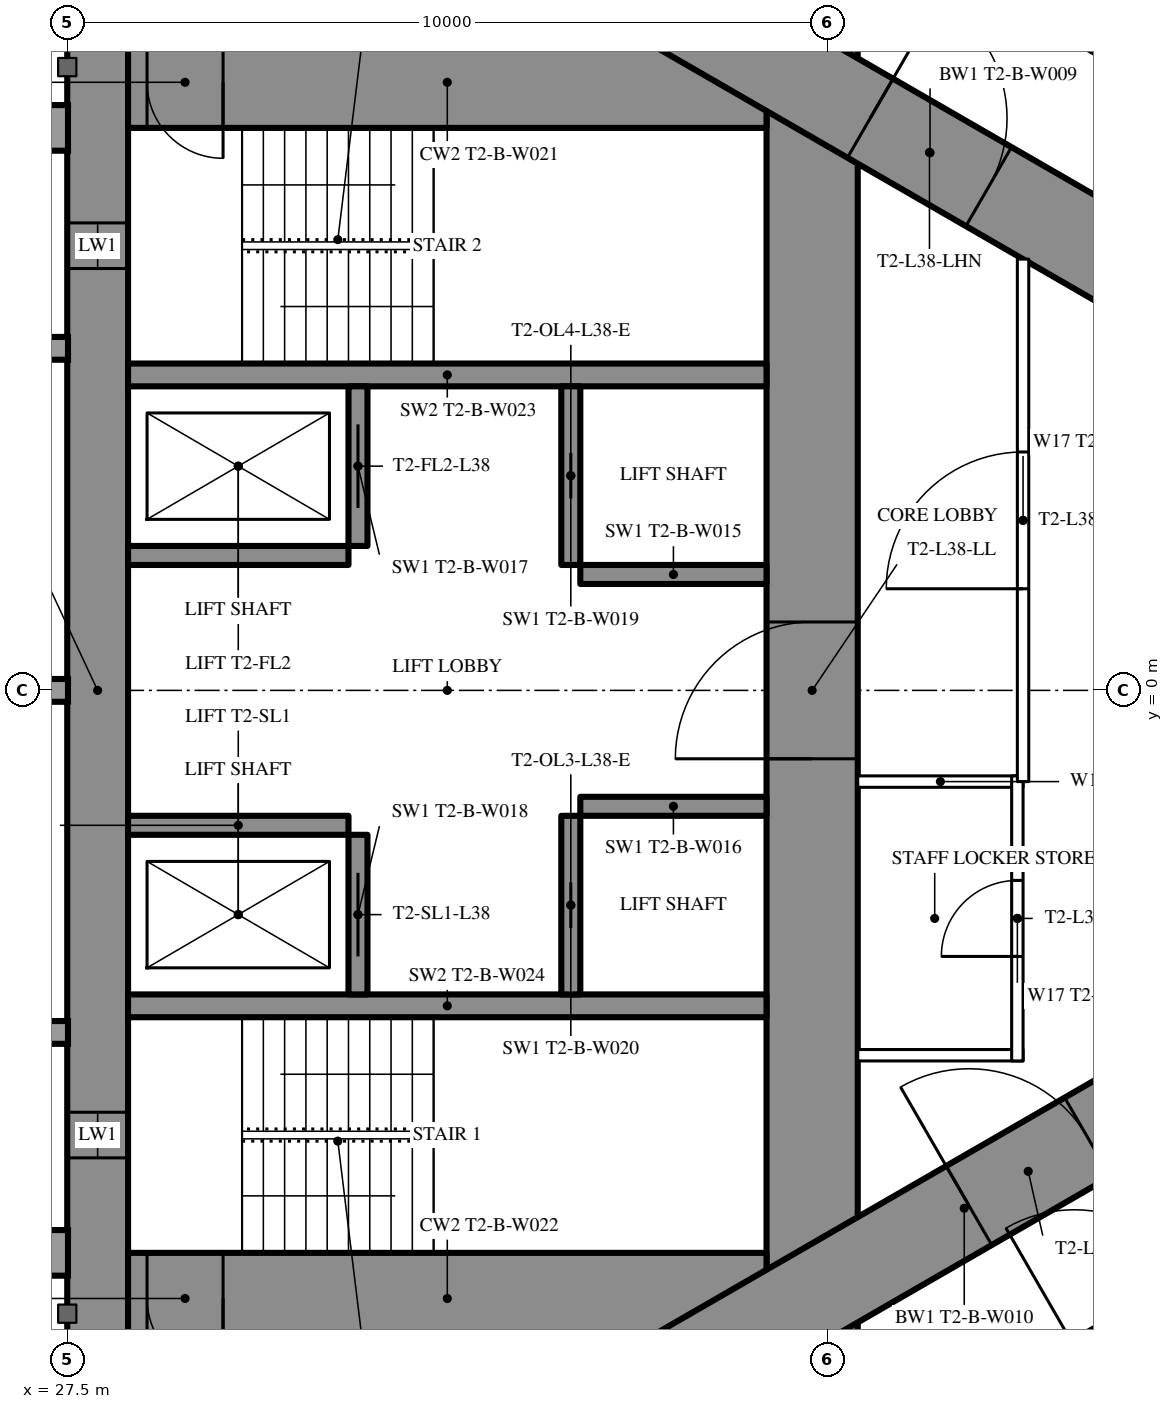
"""IFC4 building model, lengths in metres.
Left out: names, types, materials, properties, quantities, classifications, styles, units other than length and angle.
Written with IfcOpenShell. Run it as: python <this file> out.ifc"""

import sys

from ifc_helpers import new_model, si_unit, direction, frame, frame_2d, origin, place, context, subcontext, project, spatial, rectangle, extrude, element, fill, save


model = new_model("IFC4")
c1 = context("Model", 3, precision=1e-05, world=origin(), true_north=direction((0.0, 1.0)))
c2 = subcontext(c1, "Body", "Model", "MODEL_VIEW")
j1 = project(units=[si_unit("LENGTHUNIT", "METRE"), si_unit("PLANEANGLEUNIT", "RADIAN")], contexts=[c1])
p1 = place(None, origin())
s1 = spatial("IfcSite", under=j1, at=p1, CompositionType="ELEMENT")
p2 = place(p1, origin())
s2 = spatial("IfcBuilding", under=s1, at=p2, CompositionType="ELEMENT")
p3 = place(p2, frame((0.0, 0.0, 143.1)))
s3 = spatial("IfcBuildingStorey", under=s2, at=p3, CompositionType="ELEMENT", Elevation=143.1)
p4 = place(p3, frame((27.9, -8.6, 0.0), z_axis=(0.0, 0.0, 1.0), x_axis=(0.0, 1.0, 0.0)))
e1 = element("IfcWall", 1, at=p4, inside=s3, PredefinedType="SHEAR", context=c2, shape_type="SweptSolid", body=[
    extrude(rectangle(XDim=17.2, YDim=0.8, at=frame_2d((8.6, 0.0))), origin(), (0.0, 0.0, 1.0), 3.6),
])
p5 = place(p4, frame((2.45, 0.0, 0.6)))
e2 = element("IfcOpeningElement", 2, at=p5, cuts=e1, PredefinedType="OPENING", context=c2, shape_type="SweptSolid", body=[
    extrude(rectangle(XDim=0.6, YDim=2.1, at=frame_2d((0.3, 1.05))), frame((0.0, 0.41, 0.0), z_axis=(0.0, -1.0, 0.0), x_axis=(1.0, 0.0, 0.0)), (0.0, 0.0, 1.0), 0.82),
])
p6 = place(p4, frame((14.15, 0.0, 0.6)))
e3 = element("IfcOpeningElement", 3, at=p6, cuts=e1, PredefinedType="OPENING", context=c2, shape_type="SweptSolid", body=[
    extrude(rectangle(XDim=0.6, YDim=2.1, at=frame_2d((0.3, 1.05))), frame((0.0, 0.41, 0.0), z_axis=(0.0, -1.0, 0.0), x_axis=(1.0, 0.0, 0.0)), (0.0, 0.0, 1.0), 0.82),
])
p7 = place(p3, frame((37.3, -8.6, 0.0), z_axis=(0.0, 0.0, 1.0), x_axis=(0.0, 1.0, 0.0)))
e4 = element("IfcWall", 4, at=p7, inside=s3, PredefinedType="SHEAR", context=c2, shape_type="SweptSolid", body=[
    extrude(rectangle(XDim=17.2, YDim=1.2, at=frame_2d((8.6, 0.0))), origin(), (0.0, 0.0, 1.0), 3.6),
])
p8 = place(p7, frame((7.7, 0.0, 0.0)))
e5 = element("IfcOpeningElement", 5, at=p8, cuts=e4, PredefinedType="OPENING", context=c2, shape_type="SweptSolid", body=[
    extrude(rectangle(XDim=1.8, YDim=2.2, at=frame_2d((0.9, 1.1))), frame((0.0, 0.61, 0.0), z_axis=(0.0, -1.0, 0.0), x_axis=(1.0, 0.0, 0.0)), (0.0, 0.0, 1.0), 1.22),
])
p9 = place(p3, frame((28.3, -8.0, 0.0), z_axis=(0.0, 0.0, 1.0), x_axis=(1.0, 0.0, 0.0)))
e6 = element("IfcWall", 6, at=p9, inside=s3, PredefinedType="SHEAR", context=c2, shape_type="SweptSolid", body=[
    extrude(rectangle(XDim=8.4, YDim=1.2, at=frame_2d((4.2, 0.0))), origin(), (0.0, 0.0, 1.0), 3.6),
])
p10 = place(p9, frame((0.25, 0.0, 0.0)))
e7 = element("IfcOpeningElement", 7, at=p10, cuts=e6, PredefinedType="OPENING", context=c2, shape_type="SweptSolid", body=[
    extrude(rectangle(XDim=1.0, YDim=2.2, at=frame_2d((0.5, 1.1))), frame((0.0, 0.61, 0.0), z_axis=(0.0, -1.0, 0.0), x_axis=(1.0, 0.0, 0.0)), (0.0, 0.0, 1.0), 1.22),
])
p11 = place(p3, frame((28.3, 8.0, 0.0), z_axis=(0.0, 0.0, 1.0), x_axis=(1.0, 0.0, 0.0)))
e8 = element("IfcWall", 8, at=p11, inside=s3, PredefinedType="SHEAR", context=c2, shape_type="SweptSolid", body=[
    extrude(rectangle(XDim=8.4, YDim=1.2, at=frame_2d((4.2, 0.0))), origin(), (0.0, 0.0, 1.0), 3.6),
])
p12 = place(p11, frame((0.25, 0.0, 0.0)))
e9 = element("IfcOpeningElement", 9, at=p12, cuts=e8, PredefinedType="OPENING", context=c2, shape_type="SweptSolid", body=[
    extrude(rectangle(XDim=1.0, YDim=2.2, at=frame_2d((0.5, 1.1))), frame((0.0, 0.61, 0.0), z_axis=(0.0, -1.0, 0.0), x_axis=(1.0, 0.0, 0.0)), (0.0, 0.0, 1.0), 1.22),
])
for number, where, z_axis, x_axis in (
    (10, (28.3, -4.15, 0.0), (0.0, 0.0, 1.0), (1.0, 0.0, 0.0)),
    (11, (28.3, 4.15, 0.0), (0.0, 0.0, 1.0), (1.0, 0.0, 0.0)),
):
    element("IfcWall", number, at=place(p3, frame(where, z_axis=z_axis, x_axis=x_axis)), inside=s3, PredefinedType="SHEAR", context=c2, shape_type="SweptSolid", body=[
        extrude(rectangle(XDim=8.4, YDim=0.3, at=frame_2d((4.2, 0.0))), origin(), (0.0, 0.0, 1.0), 3.6),
    ])
p13 = place(p3, frame((31.325, -4.0, 0.0), z_axis=(0.0, 0.0, 1.0), x_axis=(0.0, 1.0, 0.0)))
e12 = element("IfcWall", 12, at=p13, inside=s3, PredefinedType="SHEAR", context=c2, shape_type="SweptSolid", body=[
    extrude(rectangle(XDim=2.1, YDim=0.25, at=frame_2d((1.05, 0.0))), origin(), (0.0, 0.0, 1.0), 3.6),
])
p14 = place(p13, frame((0.5, 0.0, 0.0)))
e13 = element("IfcOpeningElement", 13, at=p14, cuts=e12, PredefinedType="OPENING", context=c2, shape_type="SweptSolid", body=[
    extrude(rectangle(XDim=1.1, YDim=2.2, at=frame_2d((0.55, 1.1))), frame((0.0, 0.135, 0.0), z_axis=(0.0, -1.0, 0.0), x_axis=(1.0, 0.0, 0.0)), (0.0, 0.0, 1.0), 0.27),
])
p15 = place(p3, frame((34.125, -4.0, 0.0), z_axis=(0.0, 0.0, 1.0), x_axis=(0.0, 1.0, 0.0)))
e14 = element("IfcWall", 14, at=p15, inside=s3, PredefinedType="SHEAR", context=c2, shape_type="SweptSolid", body=[
    extrude(rectangle(XDim=2.35, YDim=0.25, at=frame_2d((1.175, 0.0))), origin(), (0.0, 0.0, 1.0), 3.6),
])
p16 = place(p15, frame((0.875, 0.0, 0.0)))
e15 = element("IfcOpeningElement", 15, at=p16, cuts=e14, PredefinedType="OPENING", context=c2, shape_type="SweptSolid", body=[
    extrude(rectangle(XDim=0.6, YDim=2.0, at=frame_2d((0.3, 1.0))), frame((0.0, 0.135, 0.0), z_axis=(0.0, -1.0, 0.0), x_axis=(1.0, 0.0, 0.0)), (0.0, 0.0, 1.0), 0.27),
])
p17 = place(p3, frame((28.3, -1.775, 0.0), z_axis=(0.0, 0.0, 1.0), x_axis=(1.0, 0.0, 0.0)))
e16 = element("IfcWall", 16, at=p17, inside=s3, PredefinedType="SHEAR", context=c2, shape_type="SweptSolid", body=[
    extrude(rectangle(XDim=2.9, YDim=0.25, at=frame_2d((1.45, 0.0))), origin(), (0.0, 0.0, 1.0), 3.6),
])
p18 = place(p3, frame((34.25, -1.525, 0.0), z_axis=(0.0, 0.0, 1.0), x_axis=(1.0, 0.0, 0.0)))
e17 = element("IfcWall", 17, at=p18, inside=s3, PredefinedType="SHEAR", context=c2, shape_type="SweptSolid", body=[
    extrude(rectangle(XDim=2.45, YDim=0.25, at=frame_2d((1.225, 0.0))), origin(), (0.0, 0.0, 1.0), 3.6),
])
p19 = place(p3, frame((31.325, 1.9, 0.0), z_axis=(0.0, 0.0, 1.0), x_axis=(0.0, 1.0, 0.0)))
e18 = element("IfcWall", 18, at=p19, inside=s3, PredefinedType="SHEAR", context=c2, shape_type="SweptSolid", body=[
    extrude(rectangle(XDim=2.1, YDim=0.25, at=frame_2d((1.05, 0.0))), origin(), (0.0, 0.0, 1.0), 3.6),
])
p20 = place(p19, frame((0.5, 0.0, 0.0)))
e19 = element("IfcOpeningElement", 19, at=p20, cuts=e18, PredefinedType="OPENING", context=c2, shape_type="SweptSolid", body=[
    extrude(rectangle(XDim=1.1, YDim=2.2, at=frame_2d((0.55, 1.1))), frame((0.0, 0.135, 0.0), z_axis=(0.0, -1.0, 0.0), x_axis=(1.0, 0.0, 0.0)), (0.0, 0.0, 1.0), 0.27),
])
p21 = place(p3, frame((34.125, 1.65, 0.0), z_axis=(0.0, 0.0, 1.0), x_axis=(0.0, 1.0, 0.0)))
e20 = element("IfcWall", 20, at=p21, inside=s3, PredefinedType="SHEAR", context=c2, shape_type="SweptSolid", body=[
    extrude(rectangle(XDim=2.35, YDim=0.25, at=frame_2d((1.175, 0.0))), origin(), (0.0, 0.0, 1.0), 3.6),
])
p22 = place(p21, frame((0.875, 0.0, 0.0)))
e21 = element("IfcOpeningElement", 21, at=p22, cuts=e20, PredefinedType="OPENING", context=c2, shape_type="SweptSolid", body=[
    extrude(rectangle(XDim=0.6, YDim=2.0, at=frame_2d((0.3, 1.0))), frame((0.0, 0.135, 0.0), z_axis=(0.0, -1.0, 0.0), x_axis=(1.0, 0.0, 0.0)), (0.0, 0.0, 1.0), 0.27),
])
p23 = place(p3, frame((28.3, 1.775, 0.0), z_axis=(0.0, 0.0, 1.0), x_axis=(1.0, 0.0, 0.0)))
e22 = element("IfcWall", 22, at=p23, inside=s3, PredefinedType="SHEAR", context=c2, shape_type="SweptSolid", body=[
    extrude(rectangle(XDim=2.9, YDim=0.25, at=frame_2d((1.45, 0.0))), origin(), (0.0, 0.0, 1.0), 3.6),
])
p24 = place(p3, frame((34.25, 1.525, 0.0), z_axis=(0.0, 0.0, 1.0), x_axis=(1.0, 0.0, 0.0)))
e23 = element("IfcWall", 23, at=p24, inside=s3, PredefinedType="SHEAR", context=c2, shape_type="SweptSolid", body=[
    extrude(rectangle(XDim=2.45, YDim=0.25, at=frame_2d((1.225, 0.0))), origin(), (0.0, 0.0, 1.0), 3.6),
])
p25 = place(p3, frame((27.2, -13.8, 0.0), z_axis=(0.0, 0.0, 1.0), x_axis=(0.866027159892, 0.499996958321, 0.0)))
e24 = element("IfcWall", 24, at=p25, inside=s3, PredefinedType="SHEAR", context=c2, shape_type="SweptSolid", body=[
    extrude(rectangle(XDim=27.947, YDim=1.2, at=frame_2d((13.973, 0.0))), origin(), (0.0, 0.0, 1.0), 3.6),
])
p26 = place(p25, frame((4.6, 0.0, 0.0)))
e25 = element("IfcOpeningElement", 25, at=p26, cuts=e24, PredefinedType="OPENING", context=c2, shape_type="SweptSolid", body=[
    extrude(rectangle(XDim=1.0, YDim=2.2, at=frame_2d((0.5, 1.1))), frame((0.0, 0.61, 0.0), z_axis=(0.0, -1.0, 0.0), x_axis=(1.0, 0.0, 0.0)), (0.0, 0.0, 1.0), 1.22),
])
p27 = place(p25, frame((14.045, 0.0, 0.0)))
e26 = element("IfcOpeningElement", 26, at=p27, cuts=e24, PredefinedType="OPENING", context=c2, shape_type="SweptSolid", body=[
    extrude(rectangle(XDim=1.8, YDim=2.2, at=frame_2d((0.9, 1.1))), frame((0.0, 0.61, 0.0), z_axis=(0.0, -1.0, 0.0), x_axis=(1.0, 0.0, 0.0)), (0.0, 0.0, 1.0), 1.22),
])
p28 = place(p3, frame((27.2, 13.8, 0.0), z_axis=(0.0, 0.0, 1.0), x_axis=(0.866024515034, -0.500001539357, 0.0)))
e27 = element("IfcWall", 27, at=p28, inside=s3, PredefinedType="SHEAR", context=c2, shape_type="SweptSolid", body=[
    extrude(rectangle(XDim=26.907, YDim=1.2, at=frame_2d((13.454, 0.0))), origin(), (0.0, 0.0, 1.0), 3.6),
])
p29 = place(p28, frame((4.5, 0.0, 0.0)))
e28 = element("IfcOpeningElement", 28, at=p29, cuts=e27, PredefinedType="OPENING", context=c2, shape_type="SweptSolid", body=[
    extrude(rectangle(XDim=1.0, YDim=2.2, at=frame_2d((0.5, 1.1))), frame((0.0, 0.61, 0.0), z_axis=(0.0, -1.0, 0.0), x_axis=(1.0, 0.0, 0.0)), (0.0, 0.0, 1.0), 1.22),
])
p30 = place(p28, frame((12.545, 0.0, 0.0)))
e29 = element("IfcOpeningElement", 29, at=p30, cuts=e27, PredefinedType="OPENING", context=c2, shape_type="SweptSolid", body=[
    extrude(rectangle(XDim=1.8, YDim=2.2, at=frame_2d((0.9, 1.1))), frame((0.0, 0.61, 0.0), z_axis=(0.0, -1.0, 0.0), x_axis=(1.0, 0.0, 0.0)), (0.0, 0.0, 1.0), 1.22),
])
p31 = place(p3, frame((37.96, -10.243, 0.0), z_axis=(0.0, 0.0, 1.0), x_axis=(0.866026429433, 0.499998223521, 0.0)))
e30 = element("IfcWall", 30, at=p31, inside=s3, PredefinedType="PARTITIONING", context=c2, shape_type="SweptSolid", body=[
    extrude(rectangle(XDim=20.487, YDim=0.2, at=frame_2d((10.243, 0.0))), origin(), (0.0, 0.0, 1.0), 3.35),
])
p32 = place(p31, frame((11.464, 0.0, 0.0)))
e31 = element("IfcOpeningElement", 31, at=p32, cuts=e30, PredefinedType="OPENING", context=c2, shape_type="SweptSolid", body=[
    extrude(rectangle(XDim=1.8, YDim=2.2, at=frame_2d((0.9, 1.1))), frame((0.0, 0.11, 0.0), z_axis=(0.0, -1.0, 0.0), x_axis=(1.0, 0.0, 0.0)), (0.0, 0.0, 1.0), 0.22),
])
p33 = place(p31, frame((17.586, 0.0, 0.0)))
e32 = element("IfcOpeningElement", 32, at=p33, cuts=e30, PredefinedType="OPENING", context=c2, shape_type="SweptSolid", body=[
    extrude(rectangle(XDim=1.8, YDim=2.14, at=frame_2d((0.9, 1.07))), frame((0.0, 0.11, 0.0), z_axis=(0.0, -1.0, 0.0), x_axis=(1.0, 0.0, 0.0)), (0.0, 0.0, 1.0), 0.22),
])
p34 = place(p31, frame((3.221, 0.0, 0.0)))
e33 = element("IfcOpeningElement", 33, at=p34, cuts=e30, PredefinedType="OPENING", context=c2, shape_type="SweptSolid", body=[
    extrude(rectangle(XDim=1.8, YDim=2.2, at=frame_2d((0.9, 1.1))), frame((0.0, 0.11, 0.0), z_axis=(0.0, -1.0, 0.0), x_axis=(1.0, 0.0, 0.0)), (0.0, 0.0, 1.0), 0.22),
])
p35 = place(p3, frame((36.834, 10.894, 0.0), z_axis=(0.0, 0.0, 1.0), x_axis=(0.866028157229, -0.499995230863, 0.0)))
e34 = element("IfcWall", 34, at=p35, inside=s3, PredefinedType="PARTITIONING", context=c2, shape_type="SweptSolid", body=[
    extrude(rectangle(XDim=21.667, YDim=0.2, at=frame_2d((10.833, 0.0))), origin(), (0.0, 0.0, 1.0), 3.35),
])
p36 = place(p35, frame((18.826, 0.0, 0.0)))
e35 = element("IfcOpeningElement", 35, at=p36, cuts=e34, PredefinedType="OPENING", context=c2, shape_type="SweptSolid", body=[
    extrude(rectangle(XDim=1.8, YDim=2.2, at=frame_2d((0.9, 1.1))), frame((0.0, 0.11, 0.0), z_axis=(0.0, -1.0, 0.0), x_axis=(1.0, 0.0, 0.0)), (0.0, 0.0, 1.0), 0.22),
])
p37 = place(p35, frame((14.938, 0.0, 0.0)))
e36 = element("IfcOpeningElement", 36, at=p37, cuts=e34, PredefinedType="OPENING", context=c2, shape_type="SweptSolid", body=[
    extrude(rectangle(XDim=1.8, YDim=2.2, at=frame_2d((0.9, 1.1))), frame((0.0, 0.11, 0.0), z_axis=(0.0, -1.0, 0.0), x_axis=(1.0, 0.0, 0.0)), (0.0, 0.0, 1.0), 0.22),
])
p38 = place(p35, frame((6.248, 0.0, 0.0)))
e37 = element("IfcOpeningElement", 37, at=p38, cuts=e34, PredefinedType="OPENING", context=c2, shape_type="SweptSolid", body=[
    extrude(rectangle(XDim=1.8, YDim=2.2, at=frame_2d((0.9, 1.1))), frame((0.0, 0.11, 0.0), z_axis=(0.0, -1.0, 0.0), x_axis=(1.0, 0.0, 0.0)), (0.0, 0.0, 1.0), 0.22),
])
for number, where, z_axis, x_axis in (
    (38, (37.9, -1.2, 0.0), (0.0, 0.0, 1.0), (1.0, 0.0, 0.0)),
    (39, (37.9, -4.8, 0.0), (0.0, 0.0, 1.0), (1.0, 0.0, 0.0)),
):
    element("IfcWall", number, at=place(p3, frame(where, z_axis=z_axis, x_axis=x_axis)), inside=s3, PredefinedType="PARTITIONING", context=c2, shape_type="SweptSolid", body=[
        extrude(rectangle(XDim=2.175, YDim=0.15, at=frame_2d((1.087, 0.0))), origin(), (0.0, 0.0, 1.0), 3.35),
    ])
p39 = place(p3, frame((40.0, -4.875, 0.0), z_axis=(0.0, 0.0, 1.0), x_axis=(0.0, 1.0, 0.0)))
e40 = element("IfcWall", 40, at=p39, inside=s3, PredefinedType="PARTITIONING", context=c2, shape_type="SweptSolid", body=[
    extrude(rectangle(XDim=3.75, YDim=0.15, at=frame_2d((1.875, 0.0))), origin(), (0.0, 0.0, 1.0), 3.35),
])
p40 = place(p39, frame((1.375, 0.0, 0.0)))
e41 = element("IfcOpeningElement", 41, at=p40, cuts=e40, PredefinedType="OPENING", context=c2, shape_type="SweptSolid", body=[
    extrude(rectangle(XDim=1.0, YDim=2.2, at=frame_2d((0.5, 1.1))), frame((0.0, 0.085, 0.0), z_axis=(0.0, -1.0, 0.0), x_axis=(1.0, 0.0, 0.0)), (0.0, 0.0, 1.0), 0.17),
])
p41 = place(p3, frame((40.075, -1.2, 0.0), z_axis=(0.0, 0.0, 1.0), x_axis=(0.0, 1.0, 0.0)))
e42 = element("IfcWall", 42, at=p41, inside=s3, PredefinedType="PARTITIONING", context=c2, shape_type="SweptSolid", body=[
    extrude(rectangle(XDim=6.874, YDim=0.15, at=frame_2d((3.437, 0.0))), origin(), (0.0, 0.0, 1.0), 3.35),
])
p42 = place(p41, frame((2.537, 0.0, 0.0)))
e43 = element("IfcOpeningElement", 43, at=p42, cuts=e42, PredefinedType="OPENING", context=c2, shape_type="SweptSolid", body=[
    extrude(rectangle(XDim=1.8, YDim=2.2, at=frame_2d((0.9, 1.1))), frame((0.0, 0.085, 0.0), z_axis=(0.0, -1.0, 0.0), x_axis=(1.0, 0.0, 0.0)), (0.0, 0.0, 1.0), 0.17),
])
p43 = place(p34, origin())
e44 = element("IfcDoor", 44, at=p43, inside=s3, OperationType="DOUBLE_DOOR_SINGLE_SWING", PredefinedType="DOOR", context=c2, shape_type="SweptSolid", body=[
    extrude(rectangle(XDim=1.8, YDim=2.2, at=frame_2d((0.9, 1.1))), frame((0.0, 0.025, 0.0), z_axis=(0.0, -1.0, 0.0), x_axis=(1.0, 0.0, 0.0)), (0.0, 0.0, 1.0), 0.05),
])
fill(e33, e44)
p44 = place(p40, origin())
e45 = element("IfcDoor", 45, at=p44, inside=s3, OperationType="SINGLE_SWING_LEFT", PredefinedType="DOOR", context=c2, shape_type="SweptSolid", body=[
    extrude(rectangle(XDim=1.0, YDim=2.2, at=frame_2d((0.5, 1.1))), frame((0.0, 0.025, 0.0), z_axis=(0.0, -1.0, 0.0), x_axis=(1.0, 0.0, 0.0)), (0.0, 0.0, 1.0), 0.05),
])
fill(e41, e45)
p45 = place(p42, origin())
e46 = element("IfcDoor", 46, at=p45, inside=s3, OperationType="DOUBLE_DOOR_SINGLE_SWING", PredefinedType="DOOR", context=c2, shape_type="SweptSolid", body=[
    extrude(rectangle(XDim=1.8, YDim=2.2, at=frame_2d((0.9, 1.1))), frame((0.0, 0.025, 0.0), z_axis=(0.0, -1.0, 0.0), x_axis=(1.0, 0.0, 0.0)), (0.0, 0.0, 1.0), 0.05),
])
fill(e43, e46)
p46 = place(p27, origin())
e47 = element("IfcDoor", 47, at=p46, inside=s3, OperationType="DOUBLE_DOOR_SINGLE_SWING", PredefinedType="DOOR", context=c2, shape_type="SweptSolid", body=[
    extrude(rectangle(XDim=1.8, YDim=2.2, at=frame_2d((0.9, 1.1))), frame((0.0, 0.025, 0.0), z_axis=(0.0, -1.0, 0.0), x_axis=(1.0, 0.0, 0.0)), (0.0, 0.0, 1.0), 0.05),
])
fill(e26, e47)
p47 = place(p30, origin())
e48 = element("IfcDoor", 48, at=p47, inside=s3, OperationType="DOUBLE_DOOR_SINGLE_SWING", PredefinedType="DOOR", context=c2, shape_type="SweptSolid", body=[
    extrude(rectangle(XDim=1.8, YDim=2.2, at=frame_2d((0.9, 1.1))), frame((0.0, 0.025, 0.0), z_axis=(0.0, -1.0, 0.0), x_axis=(1.0, 0.0, 0.0)), (0.0, 0.0, 1.0), 0.05),
])
fill(e29, e48)
p48 = place(p8, origin())
e49 = element("IfcDoor", 49, at=p48, inside=s3, OperationType="DOUBLE_DOOR_SINGLE_SWING", PredefinedType="DOOR", context=c2, shape_type="SweptSolid", body=[
    extrude(rectangle(XDim=1.8, YDim=2.2, at=frame_2d((0.9, 1.1))), frame((0.0, 0.025, 0.0), z_axis=(0.0, -1.0, 0.0), x_axis=(1.0, 0.0, 0.0)), (0.0, 0.0, 1.0), 0.05),
])
fill(e5, e49)
p49 = place(p10, origin())
e50 = element("IfcDoor", 50, at=p49, inside=s3, OperationType="SINGLE_SWING_RIGHT", PredefinedType="DOOR", context=c2, shape_type="SweptSolid", body=[
    extrude(rectangle(XDim=1.0, YDim=2.2, at=frame_2d((0.5, 1.1))), frame((0.0, 0.025, 0.0), z_axis=(0.0, -1.0, 0.0), x_axis=(1.0, 0.0, 0.0)), (0.0, 0.0, 1.0), 0.05),
])
fill(e7, e50)
p50 = place(p12, origin())
e51 = element("IfcDoor", 51, at=p50, inside=s3, OperationType="SINGLE_SWING_RIGHT", PredefinedType="DOOR", context=c2, shape_type="SweptSolid", body=[
    extrude(rectangle(XDim=1.0, YDim=2.2, at=frame_2d((0.5, 1.1))), frame((0.0, 0.025, 0.0), z_axis=(0.0, -1.0, 0.0), x_axis=(1.0, 0.0, 0.0)), (0.0, 0.0, 1.0), 0.05),
])
fill(e9, e51)
p51 = place(p14, origin())
e52 = element("IfcDoor", 52, at=p51, inside=s3, OperationType="SLIDING_TO_LEFT", PredefinedType="USERDEFINED", context=c2, shape_type="SweptSolid", body=[
    extrude(rectangle(XDim=1.1, YDim=2.2, at=frame_2d((0.55, 1.1))), frame((0.0, 0.025, 0.0), z_axis=(0.0, -1.0, 0.0), x_axis=(1.0, 0.0, 0.0)), (0.0, 0.0, 1.0), 0.05),
])
fill(e13, e52)
p52 = place(p20, origin())
e53 = element("IfcDoor", 53, at=p52, inside=s3, OperationType="SLIDING_TO_LEFT", PredefinedType="USERDEFINED", context=c2, shape_type="SweptSolid", body=[
    extrude(rectangle(XDim=1.1, YDim=2.2, at=frame_2d((0.55, 1.1))), frame((0.0, 0.025, 0.0), z_axis=(0.0, -1.0, 0.0), x_axis=(1.0, 0.0, 0.0)), (0.0, 0.0, 1.0), 0.05),
])
fill(e19, e53)
p53 = place(p16, origin())
e54 = element("IfcDoor", 54, at=p53, inside=s3, OperationType="SLIDING_TO_LEFT", PredefinedType="DOOR", context=c2, shape_type="SweptSolid", body=[
    extrude(rectangle(XDim=0.6, YDim=2.0, at=frame_2d((0.3, 1.0))), frame((0.0, 0.025, 0.0), z_axis=(0.0, -1.0, 0.0), x_axis=(1.0, 0.0, 0.0)), (0.0, 0.0, 1.0), 0.05),
])
fill(e15, e54)
p54 = place(p22, origin())
e55 = element("IfcDoor", 55, at=p54, inside=s3, OperationType="SLIDING_TO_LEFT", PredefinedType="DOOR", context=c2, shape_type="SweptSolid", body=[
    extrude(rectangle(XDim=0.6, YDim=2.0, at=frame_2d((0.3, 1.0))), frame((0.0, 0.025, 0.0), z_axis=(0.0, -1.0, 0.0), x_axis=(1.0, 0.0, 0.0)), (0.0, 0.0, 1.0), 0.05),
])
fill(e21, e55)
p55 = place(p5, origin())
e56 = element("IfcWindow", 56, at=p55, inside=s3, PartitioningType="SINGLE_PANEL", PredefinedType="WINDOW", context=c2, shape_type="SweptSolid", body=[
    extrude(rectangle(XDim=0.6, YDim=2.1, at=frame_2d((0.3, 1.05))), frame((0.0, 0.03, 0.0), z_axis=(0.0, -1.0, 0.0), x_axis=(1.0, 0.0, 0.0)), (0.0, 0.0, 1.0), 0.06),
])
fill(e2, e56)
p56 = place(p6, origin())
e57 = element("IfcWindow", 57, at=p56, inside=s3, PartitioningType="SINGLE_PANEL", PredefinedType="WINDOW", context=c2, shape_type="SweptSolid", body=[
    extrude(rectangle(XDim=0.6, YDim=2.1, at=frame_2d((0.3, 1.05))), frame((0.0, 0.03, 0.0), z_axis=(0.0, -1.0, 0.0), x_axis=(1.0, 0.0, 0.0)), (0.0, 0.0, 1.0), 0.06),
])
fill(e3, e57)
save(model, sys.argv[1])
